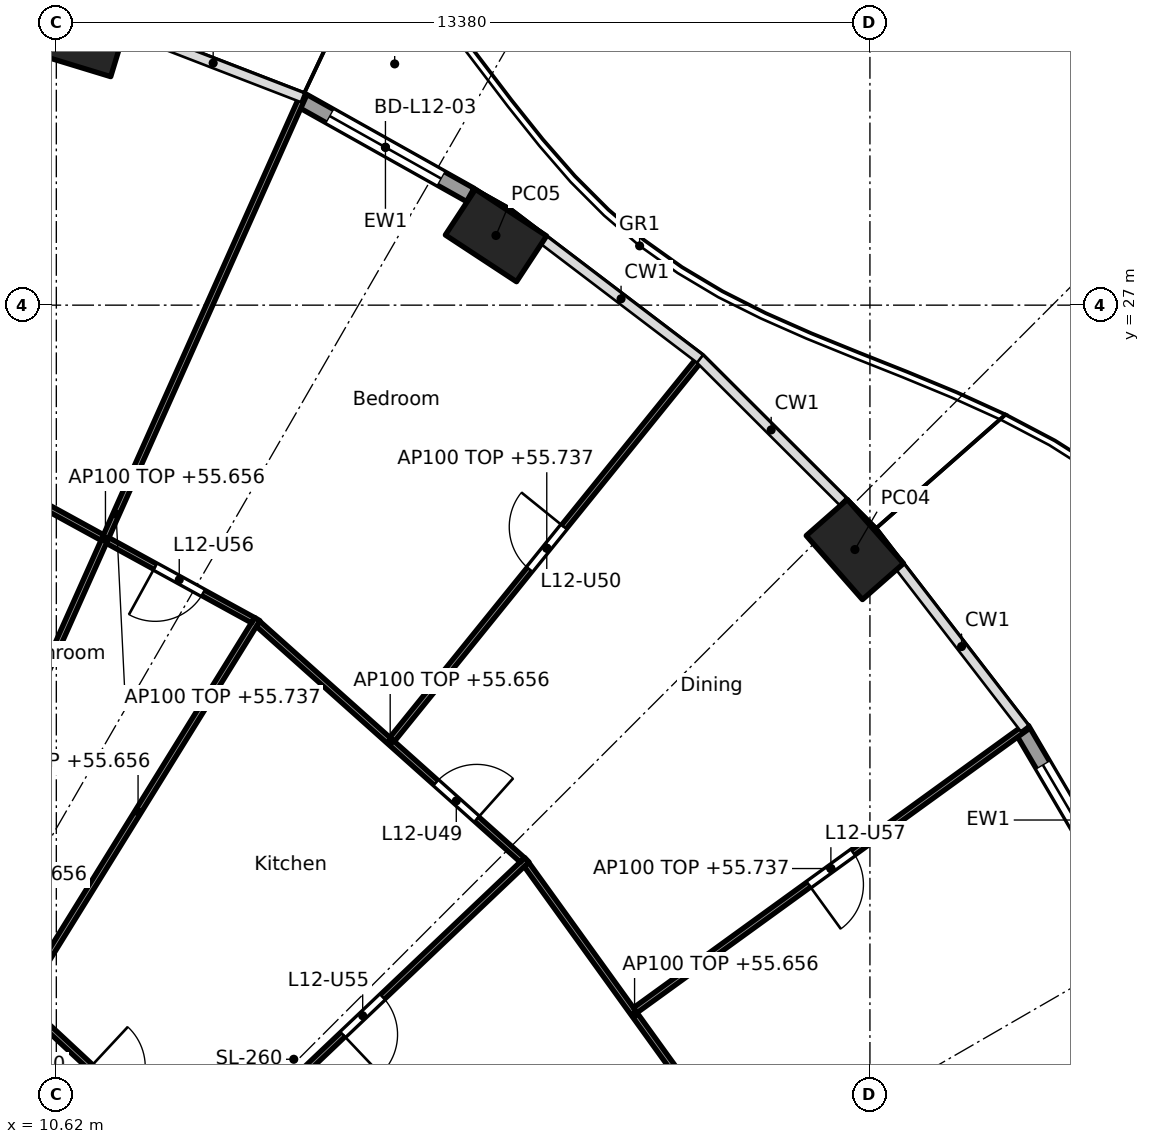
"""IFC4 building model, lengths in metres.
Left out: names, types, materials, properties, quantities, classifications, styles, units other than length and angle.
Written with IfcOpenShell. Run it as: python <this file> out.ifc"""

import sys

from ifc_helpers import new_model, si_unit, direction, frame, frame_2d, origin, origin_2d, place, context, subcontext, project, spatial, rectangle, hollow_rectangle, extrude, element, fill, save


model = new_model("IFC4")
c1 = context("Model", 3, precision=1e-05, world=origin(), true_north=direction((0.0, 1.0)))
c2 = subcontext(c1, "Body", "Model", "MODEL_VIEW")
j1 = project(units=[si_unit("LENGTHUNIT", "METRE"), si_unit("PLANEANGLEUNIT", "RADIAN")], contexts=[c1])
p1 = place(None, origin())
s1 = spatial("IfcSite", under=j1, at=p1, CompositionType="ELEMENT")
p2 = place(p1, origin())
s2 = spatial("IfcBuilding", under=s1, at=p2, CompositionType="ELEMENT")
p3 = place(p2, frame((0.0, 0.0, 52.9)))
s3 = spatial("IfcBuildingStorey", under=s2, at=p3, CompositionType="ELEMENT", Elevation=52.9)
for number, where, z_axis, x_axis in (
    (1, (23.752, 22.981, 0.0), (0.0, 0.0, 1.0), (-0.66, 0.751, 0.0)),
    (2, (17.85, 28.146, 0.0), (0.0, 0.0, 1.0), (-0.836, 0.549, 0.0)),
    (3, (10.976, 31.393, 0.0), (0.0, 0.0, 1.0), (-0.957, 0.292, 0.0)),
):
    element("IfcColumn", number, at=place(p3, frame(where, z_axis=z_axis, x_axis=x_axis)), inside=s3, PredefinedType="COLUMN", context=c2, shape_type="SweptSolid", body=[
        extrude(hollow_rectangle(XDim=1.4, YDim=0.9, WallThickness=0.05, at=origin_2d()), origin(), (0.0, 0.0, 1.0), 3.7),
    ])
p4 = place(p3, frame((26.5, 20.026, 0.0), z_axis=(0.0, 0.0, 1.0), x_axis=(0.506311160839, -0.862350861546, 0.0)))
e4 = element("IfcWall", 4, at=p4, inside=s3, PredefinedType="SOLIDWALL", context=c2, shape_type="SweptSolid", body=[
    extrude(rectangle(XDim=3.462, YDim=0.25, at=frame_2d((1.731, 0.0))), origin(), (0.0, 0.0, 1.0), 3.44),
])
p5 = place(p4, frame((0.681, 0.0, 0.0)))
e5 = element("IfcOpeningElement", 5, at=p5, cuts=e4, PredefinedType="OPENING", context=c2, shape_type="SweptSolid", body=[
    extrude(rectangle(XDim=2.1, YDim=2.4, at=frame_2d((1.05, 1.2))), frame((0.0, 0.135, 0.0), z_axis=(0.0, -1.0, 0.0), x_axis=(1.0, 0.0, 0.0)), (0.0, 0.0, 1.0), 0.27),
])
p6 = place(p3, frame((14.637, 30.379, 0.0), z_axis=(0.0, 0.0, 1.0), x_axis=(0.872102558443, -0.489323132048, 0.0)))
e6 = element("IfcWall", 6, at=p6, inside=s3, PredefinedType="SOLIDWALL", context=c2, shape_type="SweptSolid", body=[
    extrude(rectangle(XDim=3.201, YDim=0.25, at=frame_2d((1.601, 0.0))), origin(), (0.0, 0.0, 1.0), 3.44),
])
p7 = place(p6, frame((0.551, 0.0, 0.0)))
e7 = element("IfcOpeningElement", 7, at=p7, cuts=e6, PredefinedType="OPENING", context=c2, shape_type="SweptSolid", body=[
    extrude(rectangle(XDim=2.1, YDim=2.4, at=frame_2d((1.05, 1.2))), frame((0.0, 0.135, 0.0), z_axis=(0.0, -1.0, 0.0), x_axis=(1.0, 0.0, 0.0)), (0.0, 0.0, 1.0), 0.27),
])
p8 = place(p3, frame((21.908, 12.866, 0.0), z_axis=(0.0, 0.0, 1.0), x_axis=(-0.584558392935, 0.811351640936, 0.0)))
e8 = element("IfcWall", 8, at=p8, inside=s3, PredefinedType="PARTITIONING", context=c2, shape_type="SweptSolid", body=[
    extrude(rectangle(XDim=6.084, YDim=0.1, at=frame_2d((3.042, 0.0))), origin(), (0.0, 0.0, 1.0), 2.756),
])
p9 = place(p3, frame((20.141, 15.405, 0.0), z_axis=(0.0, 0.0, 1.0), x_axis=(0.809834895779, 0.58665785734, 0.0)))
e9 = element("IfcWall", 9, at=p9, inside=s3, PredefinedType="PARTITIONING", context=c2, shape_type="SweptSolid", body=[
    extrude(rectangle(XDim=7.945, YDim=0.1, at=frame_2d((3.973, 0.0))), origin(), (0.0, 0.0, 1.0), 2.837),
])
p10 = place(p9, frame((3.522, 0.0, 0.0)))
e10 = element("IfcOpeningElement", 10, at=p10, cuts=e9, PredefinedType="OPENING", context=c2, shape_type="SweptSolid", body=[
    extrude(rectangle(XDim=0.9, YDim=2.1, at=frame_2d((0.45, 1.05))), frame((0.0, 0.06, 0.0), z_axis=(0.0, -1.0, 0.0), x_axis=(1.0, 0.0, 0.0)), (0.0, 0.0, 1.0), 0.12),
])
p11 = place(p3, frame((8.957, 8.953, 0.0), z_axis=(0.0, 0.0, 1.0), x_axis=(0.725250022034, 0.688485588476, 0.0)))
e11 = element("IfcWall", 11, at=p11, inside=s3, PredefinedType="PARTITIONING", context=c2, shape_type="SweptSolid", body=[
    extrude(rectangle(XDim=12.963, YDim=0.1, at=frame_2d((6.481, 0.0))), origin(), (0.0, 0.0, 1.0), 2.687),
])
p12 = place(p11, frame((2.333, 0.0, 0.0)))
e12 = element("IfcOpeningElement", 12, at=p12, cuts=e11, PredefinedType="OPENING", context=c2, shape_type="SweptSolid", body=[
    extrude(rectangle(XDim=0.9, YDim=2.1, at=frame_2d((0.45, 1.05))), frame((0.0, 0.06, 0.0), z_axis=(0.0, -1.0, 0.0), x_axis=(1.0, 0.0, 0.0)), (0.0, 0.0, 1.0), 0.12),
])
p13 = place(p11, frame((8.79, 0.0, 0.0)))
e13 = element("IfcOpeningElement", 13, at=p13, cuts=e11, PredefinedType="OPENING", context=c2, shape_type="SweptSolid", body=[
    extrude(rectangle(XDim=0.9, YDim=2.1, at=frame_2d((0.45, 1.05))), frame((0.0, 0.06, 0.0), z_axis=(0.0, -1.0, 0.0), x_axis=(1.0, 0.0, 0.0)), (0.0, 0.0, 1.0), 0.12),
])
p14 = place(p3, frame((12.958, 12.82, 0.0), z_axis=(0.0, 0.0, 1.0), x_axis=(-0.732022571638, 0.681280378855, 0.0)))
e14 = element("IfcWall", 14, at=p14, inside=s3, PredefinedType="PARTITIONING", context=c2, shape_type="SweptSolid", body=[
    extrude(rectangle(XDim=3.95, YDim=0.1, at=frame_2d((1.975, 0.0))), origin(), (0.0, 0.0, 1.0), 3.44),
])
p15 = place(p14, frame((1.525, 0.0, 0.0)))
e15 = element("IfcOpeningElement", 15, at=p15, cuts=e14, PredefinedType="OPENING", context=c2, shape_type="SweptSolid", body=[
    extrude(rectangle(XDim=0.9, YDim=2.1, at=frame_2d((0.45, 1.05))), frame((0.0, 0.06, 0.0), z_axis=(0.0, -1.0, 0.0), x_axis=(1.0, 0.0, 0.0)), (0.0, 0.0, 1.0), 0.12),
])
p16 = place(p3, frame((18.285, 17.877, 0.0), z_axis=(0.0, 0.0, 1.0), x_axis=(-0.745806142791, 0.666163041136, 0.0)))
e16 = element("IfcWall", 16, at=p16, inside=s3, PredefinedType="PARTITIONING", context=c2, shape_type="SweptSolid", body=[
    extrude(rectangle(XDim=5.831, YDim=0.1, at=frame_2d((2.915, 0.0))), origin(), (0.0, 0.0, 1.0), 2.756),
])
p17 = place(p16, frame((1.008, 0.0, 0.0)))
e17 = element("IfcOpeningElement", 17, at=p17, cuts=e16, PredefinedType="OPENING", context=c2, shape_type="SweptSolid", body=[
    extrude(rectangle(XDim=0.9, YDim=2.1, at=frame_2d((0.45, 1.05))), frame((0.0, 0.06, 0.0), z_axis=(0.0, -1.0, 0.0), x_axis=(1.0, 0.0, 0.0)), (0.0, 0.0, 1.0), 0.12),
])
p18 = place(p3, frame((16.142, 19.858, 0.0), z_axis=(0.0, 0.0, 1.0), x_axis=(0.628738066508, 0.777617157555, 0.0)))
e18 = element("IfcWall", 18, at=p18, inside=s3, PredefinedType="PARTITIONING", context=c2, shape_type="SweptSolid", body=[
    extrude(rectangle(XDim=8.091, YDim=0.1, at=frame_2d((4.045, 0.0))), origin(), (0.0, 0.0, 1.0), 2.837),
])
p19 = place(p18, frame((3.595, 0.0, 0.0)))
e19 = element("IfcOpeningElement", 19, at=p19, cuts=e18, PredefinedType="OPENING", context=c2, shape_type="SweptSolid", body=[
    extrude(rectangle(XDim=0.9, YDim=2.1, at=frame_2d((0.45, 1.05))), frame((0.0, 0.06, 0.0), z_axis=(0.0, -1.0, 0.0), x_axis=(1.0, 0.0, 0.0)), (0.0, 0.0, 1.0), 0.12),
])
p20 = place(p3, frame((10.003, 15.503, 0.0), z_axis=(0.0, 0.0, 1.0), x_axis=(0.52645953022, 0.850200189979, 0.0)))
e20 = element("IfcWall", 20, at=p20, inside=s3, PredefinedType="PARTITIONING", context=c2, shape_type="SweptSolid", body=[
    extrude(rectangle(XDim=7.45, YDim=0.1, at=frame_2d((3.725, 0.0))), origin(), (0.0, 0.0, 1.0), 2.756),
])
p21 = place(p3, frame((13.855, 21.818, 0.0), z_axis=(0.0, 0.0, 1.0), x_axis=(-0.876794415294, 0.480865421203, 0.0)))
e21 = element("IfcWall", 21, at=p21, inside=s3, PredefinedType="PARTITIONING", context=c2, shape_type="SweptSolid", body=[
    extrude(rectangle(XDim=5.536, YDim=0.1, at=frame_2d((2.768, 0.0))), origin(), (0.0, 0.0, 1.0), 2.756),
])
p22 = place(p21, frame((0.934, 0.0, 0.0)))
e22 = element("IfcOpeningElement", 22, at=p22, cuts=e21, PredefinedType="OPENING", context=c2, shape_type="SweptSolid", body=[
    extrude(rectangle(XDim=0.9, YDim=2.1, at=frame_2d((0.45, 1.05))), frame((0.0, 0.06, 0.0), z_axis=(0.0, -1.0, 0.0), x_axis=(1.0, 0.0, 0.0)), (0.0, 0.0, 1.0), 0.12),
])
p23 = place(p3, frame((8.524, 16.676, 0.0), z_axis=(0.0, 0.0, 1.0), x_axis=(0.408065177262, 0.912952797852, 0.0)))
e23 = element("IfcWall", 23, at=p23, inside=s3, PredefinedType="PARTITIONING", context=c2, shape_type="SweptSolid", body=[
    extrude(rectangle(XDim=15.089, YDim=0.1, at=frame_2d((7.544, 0.0))), origin(), (0.0, 0.0, 1.0), 2.837),
])
p24 = place(p5, origin())
e24 = element("IfcDoor", 24, at=p24, inside=s3, OperationType="SLIDING_TO_LEFT", PredefinedType="DOOR", context=c2, shape_type="SweptSolid", body=[
    extrude(rectangle(XDim=2.1, YDim=2.4, at=frame_2d((1.05, 1.2))), frame((0.0, 0.025, 0.0), z_axis=(0.0, -1.0, 0.0), x_axis=(1.0, 0.0, 0.0)), (0.0, 0.0, 1.0), 0.05),
])
fill(e5, e24)
p25 = place(p7, origin())
e25 = element("IfcDoor", 25, at=p25, inside=s3, OperationType="SLIDING_TO_LEFT", PredefinedType="DOOR", context=c2, shape_type="SweptSolid", body=[
    extrude(rectangle(XDim=2.1, YDim=2.4, at=frame_2d((1.05, 1.2))), frame((0.0, 0.025, 0.0), z_axis=(0.0, -1.0, 0.0), x_axis=(1.0, 0.0, 0.0)), (0.0, 0.0, 1.0), 0.05),
])
fill(e7, e25)
p26 = place(p17, frame((0.9, 0.0, 0.0), x_axis=(-1.0, 0.0, 0.0)))
e26 = element("IfcDoor", 26, at=p26, inside=s3, OperationType="SINGLE_SWING_RIGHT", PredefinedType="DOOR", context=c2, shape_type="SweptSolid", body=[
    extrude(rectangle(XDim=0.9, YDim=2.1, at=frame_2d((0.45, 1.05))), frame((0.0, 0.025, 0.0), z_axis=(0.0, -1.0, 0.0), x_axis=(1.0, 0.0, 0.0)), (0.0, 0.0, 1.0), 0.05),
])
fill(e17, e26)
p27 = place(p19, origin())
e27 = element("IfcDoor", 27, at=p27, inside=s3, OperationType="SINGLE_SWING_RIGHT", PredefinedType="DOOR", context=c2, shape_type="SweptSolid", body=[
    extrude(rectangle(XDim=0.9, YDim=2.1, at=frame_2d((0.45, 1.05))), frame((0.0, 0.025, 0.0), z_axis=(0.0, -1.0, 0.0), x_axis=(1.0, 0.0, 0.0)), (0.0, 0.0, 1.0), 0.05),
])
fill(e19, e27)
p28 = place(p13, frame((0.9, 0.0, 0.0), x_axis=(-1.0, 0.0, 0.0)))
e28 = element("IfcDoor", 28, at=p28, inside=s3, OperationType="SINGLE_SWING_RIGHT", PredefinedType="DOOR", context=c2, shape_type="SweptSolid", body=[
    extrude(rectangle(XDim=0.9, YDim=2.1, at=frame_2d((0.45, 1.05))), frame((0.0, 0.025, 0.0), z_axis=(0.0, -1.0, 0.0), x_axis=(1.0, 0.0, 0.0)), (0.0, 0.0, 1.0), 0.05),
])
fill(e13, e28)
p29 = place(p22, origin())
e29 = element("IfcDoor", 29, at=p29, inside=s3, OperationType="SINGLE_SWING_RIGHT", PredefinedType="DOOR", context=c2, shape_type="SweptSolid", body=[
    extrude(rectangle(XDim=0.9, YDim=2.1, at=frame_2d((0.45, 1.05))), frame((0.0, 0.025, 0.0), z_axis=(0.0, -1.0, 0.0), x_axis=(1.0, 0.0, 0.0)), (0.0, 0.0, 1.0), 0.05),
])
fill(e22, e29)
p30 = place(p10, frame((0.9, 0.0, 0.0), x_axis=(-1.0, 0.0, 0.0)))
e30 = element("IfcDoor", 30, at=p30, inside=s3, OperationType="SINGLE_SWING_RIGHT", PredefinedType="DOOR", context=c2, shape_type="SweptSolid", body=[
    extrude(rectangle(XDim=0.9, YDim=2.1, at=frame_2d((0.45, 1.05))), frame((0.0, 0.025, 0.0), z_axis=(0.0, -1.0, 0.0), x_axis=(1.0, 0.0, 0.0)), (0.0, 0.0, 1.0), 0.05),
])
fill(e10, e30)
save(model, sys.argv[1])
